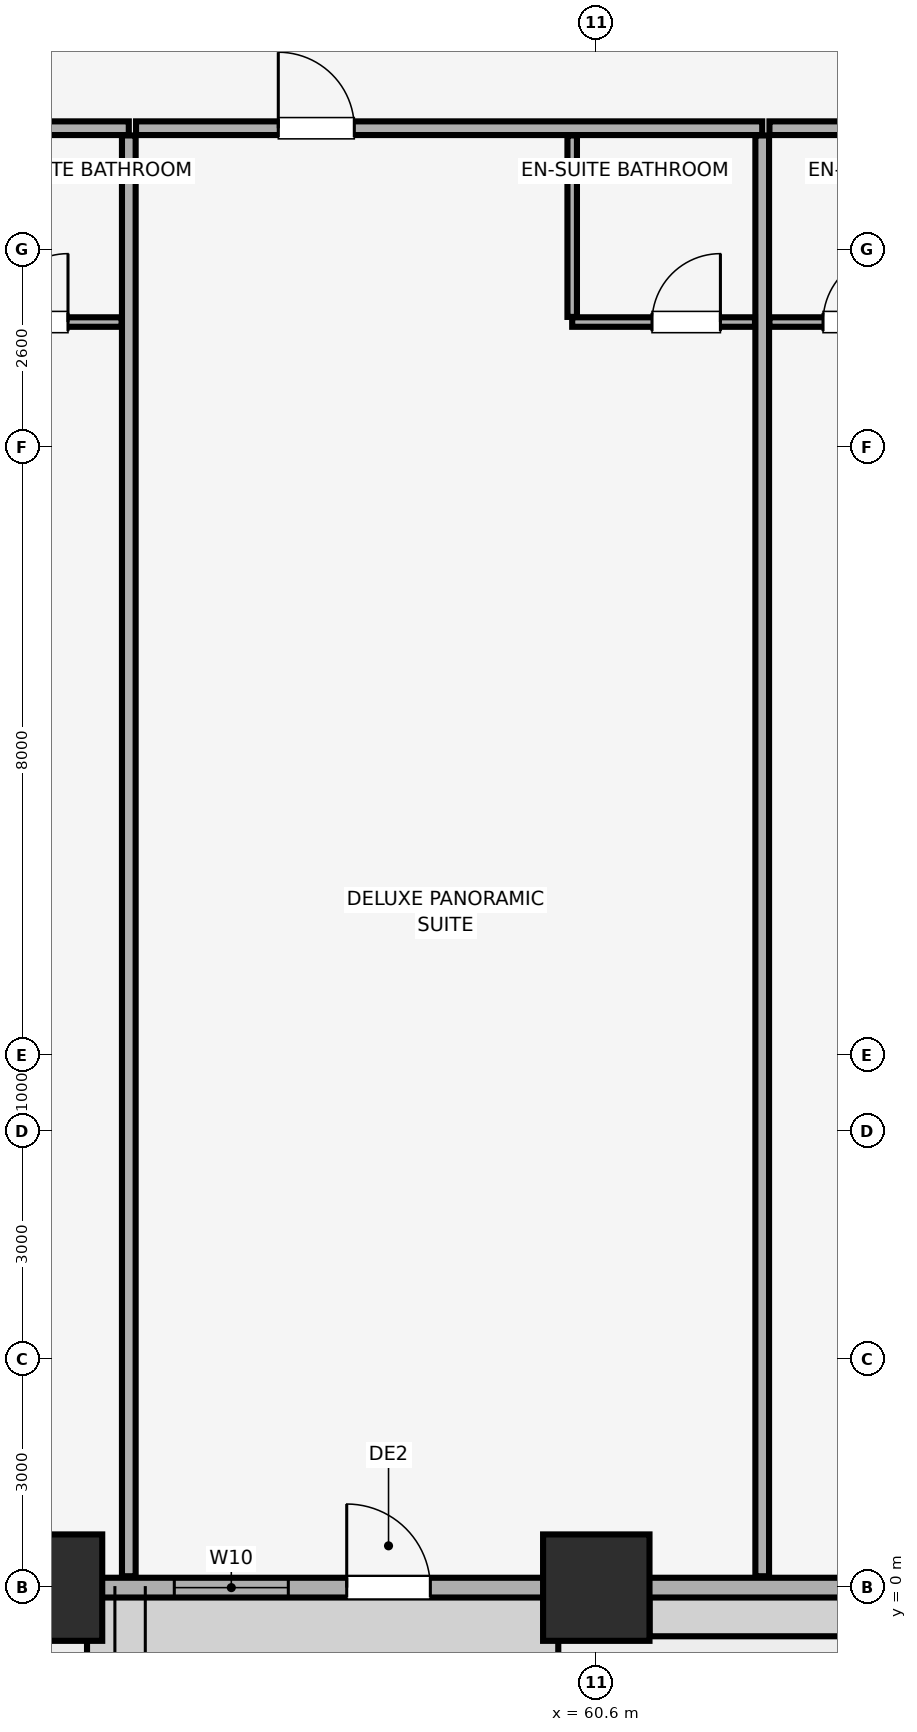
"""IFC4 building model, lengths in metres.
Left out: names, types, materials, properties, quantities, classifications, styles, units other than length and angle.
Written with IfcOpenShell. Run it as: python <this file> out.ifc"""

import sys

from ifc_helpers import new_model, si_unit, direction, frame, frame_2d, origin, origin_2d, place, context, subcontext, project, spatial, rectangle, extrude, element, fill, save


model = new_model("IFC4")
c1 = context("Model", 3, precision=1e-05, world=origin(), true_north=direction((0.0, 1.0)))
c2 = subcontext(c1, "Body", "Model", "MODEL_VIEW")
j1 = project(units=[si_unit("LENGTHUNIT", "METRE"), si_unit("PLANEANGLEUNIT", "RADIAN")], contexts=[c1])
p1 = place(None, origin())
s1 = spatial("IfcSite", under=j1, at=p1, CompositionType="ELEMENT")
p2 = place(p1, origin())
s2 = spatial("IfcBuilding", under=s1, at=p2, CompositionType="ELEMENT")
p3 = place(p2, frame((0.0, 0.0, 72.65)))
s3 = spatial("IfcBuildingStorey", under=s2, at=p3, CompositionType="ELEMENT", Elevation=72.65)
for number, where, z_axis, x_axis in (
    (1, (53.4, 0.0, 0.0), (0.0, 0.0, 1.0), (1.0, 0.0, 0.0)),
    (2, (60.6, 0.0, 0.0), (0.0, 0.0, 1.0), (1.0, 0.0, 0.0)),
):
    element("IfcColumn", number, at=place(p3, frame(where, z_axis=z_axis, x_axis=x_axis)), inside=s3, PredefinedType="COLUMN", context=c2, shape_type="SweptSolid", body=[
        extrude(rectangle(XDim=1.4, YDim=1.4, at=origin_2d()), origin(), (0.0, 0.0, 1.0), 3.51),
    ])
p4 = place(p3, frame((4.2, 0.0, 0.0), z_axis=(0.0, 0.0, 1.0), x_axis=(1.0, 0.0, 0.0)))
e3 = element("IfcWall", 3, at=p4, inside=s3, PredefinedType="SOLIDWALL", context=c2, shape_type="SweptSolid", body=[
    extrude(rectangle(XDim=75.6, YDim=0.26, at=frame_2d((37.8, 0.0))), origin(), (0.0, 0.0, 1.0), 2.56),
])
p5 = place(p4, frame((21.383, 0.0, 0.0)))
e4 = element("IfcOpeningElement", 4, at=p5, cuts=e3, PredefinedType="OPENING", context=c2, shape_type="SweptSolid", body=[
    extrude(rectangle(XDim=1.1, YDim=2.15, at=frame_2d((0.55, 1.075))), frame((0.0, 0.14, 0.0), z_axis=(0.0, -1.0, 0.0), x_axis=(1.0, 0.0, 0.0)), (0.0, 0.0, 1.0), 0.28),
])
p6 = place(p4, frame((37.25, 0.0, 0.0)))
e5 = element("IfcOpeningElement", 5, at=p6, cuts=e3, PredefinedType="OPENING", context=c2, shape_type="SweptSolid", body=[
    extrude(rectangle(XDim=1.1, YDim=2.15, at=frame_2d((0.55, 1.075))), frame((0.0, 0.14, 0.0), z_axis=(0.0, -1.0, 0.0), x_axis=(1.0, 0.0, 0.0)), (0.0, 0.0, 1.0), 0.28),
])
p7 = place(p4, frame((53.117, 0.0, 0.0)))
e6 = element("IfcOpeningElement", 6, at=p7, cuts=e3, PredefinedType="OPENING", context=c2, shape_type="SweptSolid", body=[
    extrude(rectangle(XDim=1.1, YDim=2.15, at=frame_2d((0.55, 1.075))), frame((0.0, 0.14, 0.0), z_axis=(0.0, -1.0, 0.0), x_axis=(1.0, 0.0, 0.0)), (0.0, 0.0, 1.0), 0.28),
])
p8 = place(p4, frame((1.035, 0.0, 0.85)))
e7 = element("IfcOpeningElement", 7, at=p8, cuts=e3, PredefinedType="OPENING", context=c2, shape_type="SweptSolid", body=[
    extrude(rectangle(XDim=2.4, YDim=1.5, at=frame_2d((1.2, 0.75))), frame((0.0, 0.14, 0.0), z_axis=(0.0, -1.0, 0.0), x_axis=(1.0, 0.0, 0.0)), (0.0, 0.0, 1.0), 0.28),
])
p9 = place(p4, frame((5.691, 0.0, 0.85)))
e8 = element("IfcOpeningElement", 8, at=p9, cuts=e3, PredefinedType="OPENING", context=c2, shape_type="SweptSolid", body=[
    extrude(rectangle(XDim=2.4, YDim=1.5, at=frame_2d((1.2, 0.75))), frame((0.0, 0.14, 0.0), z_axis=(0.0, -1.0, 0.0), x_axis=(1.0, 0.0, 0.0)), (0.0, 0.0, 1.0), 0.28),
])
p10 = place(p4, frame((9.342, 0.0, 0.85)))
e9 = element("IfcOpeningElement", 9, at=p10, cuts=e3, PredefinedType="OPENING", context=c2, shape_type="SweptSolid", body=[
    extrude(rectangle(XDim=1.5, YDim=1.4, at=frame_2d((0.75, 0.7))), frame((0.0, 0.14, 0.0), z_axis=(0.0, -1.0, 0.0), x_axis=(1.0, 0.0, 0.0)), (0.0, 0.0, 1.0), 0.28),
])
p11 = place(p4, frame((13.458, 0.0, 0.85)))
e10 = element("IfcOpeningElement", 10, at=p11, cuts=e3, PredefinedType="OPENING", context=c2, shape_type="SweptSolid", body=[
    extrude(rectangle(XDim=2.4, YDim=1.5, at=frame_2d((1.2, 0.75))), frame((0.0, 0.14, 0.0), z_axis=(0.0, -1.0, 0.0), x_axis=(1.0, 0.0, 0.0)), (0.0, 0.0, 1.0), 0.28),
])
p12 = place(p4, frame((23.202, 0.0, 0.85)))
e11 = element("IfcOpeningElement", 11, at=p12, cuts=e3, PredefinedType="OPENING", context=c2, shape_type="SweptSolid", body=[
    extrude(rectangle(XDim=1.5, YDim=1.4, at=frame_2d((0.75, 0.7))), frame((0.0, 0.14, 0.0), z_axis=(0.0, -1.0, 0.0), x_axis=(1.0, 0.0, 0.0)), (0.0, 0.0, 1.0), 0.28),
])
p13 = place(p4, frame((28.8, 0.0, 0.85)))
e12 = element("IfcOpeningElement", 12, at=p13, cuts=e3, PredefinedType="OPENING", context=c2, shape_type="SweptSolid", body=[
    extrude(rectangle(XDim=2.4, YDim=1.5, at=frame_2d((1.2, 0.75))), frame((0.0, 0.14, 0.0), z_axis=(0.0, -1.0, 0.0), x_axis=(1.0, 0.0, 0.0)), (0.0, 0.0, 1.0), 0.28),
])
p14 = place(p4, frame((34.79, 0.0, 0.85)))
e13 = element("IfcOpeningElement", 13, at=p14, cuts=e3, PredefinedType="OPENING", context=c2, shape_type="SweptSolid", body=[
    extrude(rectangle(XDim=1.5, YDim=1.4, at=frame_2d((0.75, 0.7))), frame((0.0, 0.14, 0.0), z_axis=(0.0, -1.0, 0.0), x_axis=(1.0, 0.0, 0.0)), (0.0, 0.0, 1.0), 0.28),
])
p15 = place(p4, frame((39.31, 0.0, 0.85)))
e14 = element("IfcOpeningElement", 14, at=p15, cuts=e3, PredefinedType="OPENING", context=c2, shape_type="SweptSolid", body=[
    extrude(rectangle(XDim=1.5, YDim=1.4, at=frame_2d((0.75, 0.7))), frame((0.0, 0.14, 0.0), z_axis=(0.0, -1.0, 0.0), x_axis=(1.0, 0.0, 0.0)), (0.0, 0.0, 1.0), 0.28),
])
p16 = place(p4, frame((44.4, 0.0, 0.85)))
e15 = element("IfcOpeningElement", 15, at=p16, cuts=e3, PredefinedType="OPENING", context=c2, shape_type="SweptSolid", body=[
    extrude(rectangle(XDim=2.4, YDim=1.5, at=frame_2d((1.2, 0.75))), frame((0.0, 0.14, 0.0), z_axis=(0.0, -1.0, 0.0), x_axis=(1.0, 0.0, 0.0)), (0.0, 0.0, 1.0), 0.28),
])
p17 = place(p4, frame((50.848, 0.0, 0.85)))
e16 = element("IfcOpeningElement", 16, at=p17, cuts=e3, PredefinedType="OPENING", context=c2, shape_type="SweptSolid", body=[
    extrude(rectangle(XDim=1.5, YDim=1.4, at=frame_2d((0.75, 0.7))), frame((0.0, 0.14, 0.0), z_axis=(0.0, -1.0, 0.0), x_axis=(1.0, 0.0, 0.0)), (0.0, 0.0, 1.0), 0.28),
])
p18 = place(p4, frame((59.691, 0.0, 0.85)))
e17 = element("IfcOpeningElement", 17, at=p18, cuts=e3, PredefinedType="OPENING", context=c2, shape_type="SweptSolid", body=[
    extrude(rectangle(XDim=2.4, YDim=1.5, at=frame_2d((1.2, 0.75))), frame((0.0, 0.14, 0.0), z_axis=(0.0, -1.0, 0.0), x_axis=(1.0, 0.0, 0.0)), (0.0, 0.0, 1.0), 0.28),
])
p19 = place(p4, frame((64.708, 0.0, 0.85)))
e18 = element("IfcOpeningElement", 18, at=p19, cuts=e3, PredefinedType="OPENING", context=c2, shape_type="SweptSolid", body=[
    extrude(rectangle(XDim=1.5, YDim=1.4, at=frame_2d((0.75, 0.7))), frame((0.0, 0.14, 0.0), z_axis=(0.0, -1.0, 0.0), x_axis=(1.0, 0.0, 0.0)), (0.0, 0.0, 1.0), 0.28),
])
p20 = place(p4, frame((67.458, 0.0, 0.85)))
e19 = element("IfcOpeningElement", 19, at=p20, cuts=e3, PredefinedType="OPENING", context=c2, shape_type="SweptSolid", body=[
    extrude(rectangle(XDim=2.4, YDim=1.5, at=frame_2d((1.2, 0.75))), frame((0.0, 0.14, 0.0), z_axis=(0.0, -1.0, 0.0), x_axis=(1.0, 0.0, 0.0)), (0.0, 0.0, 1.0), 0.28),
])
p21 = place(p4, frame((72.165, 0.0, 0.85)))
e20 = element("IfcOpeningElement", 20, at=p21, cuts=e3, PredefinedType="OPENING", context=c2, shape_type="SweptSolid", body=[
    extrude(rectangle(XDim=2.4, YDim=1.5, at=frame_2d((1.2, 0.75))), frame((0.0, 0.14, 0.0), z_axis=(0.0, -1.0, 0.0), x_axis=(1.0, 0.0, 0.0)), (0.0, 0.0, 1.0), 0.28),
])
p22 = place(p3, frame((46.211, 19.2, 0.0), z_axis=(0.0, 0.0, 1.0), x_axis=(1.0, 0.0, 0.0)))
e21 = element("IfcWall", 21, at=p22, inside=s3, PredefinedType="PARTITIONING", context=c2, shape_type="SweptSolid", body=[
    extrude(rectangle(XDim=8.238, YDim=0.18, at=frame_2d((4.119, 0.0))), origin(), (0.0, 0.0, 1.0), 3.51),
])
p23 = place(p22, frame((2.303, 0.0, 0.0)))
e22 = element("IfcOpeningElement", 22, at=p23, cuts=e21, PredefinedType="OPENING", context=c2, shape_type="SweptSolid", body=[
    extrude(rectangle(XDim=1.0, YDim=2.15, at=frame_2d((0.5, 1.075))), frame((0.0, 0.1, 0.0), z_axis=(0.0, -1.0, 0.0), x_axis=(1.0, 0.0, 0.0)), (0.0, 0.0, 1.0), 0.2),
])
p24 = place(p3, frame((54.45, 0.15, 0.0), z_axis=(0.0, 0.0, 1.0), x_axis=(0.0, 1.0, 0.0)))
e23 = element("IfcWall", 23, at=p24, inside=s3, PredefinedType="PARTITIONING", context=c2, shape_type="SweptSolid", body=[
    extrude(rectangle(XDim=18.955, YDim=0.18, at=frame_2d((9.478, 0.0))), origin(), (0.0, 0.0, 1.0), 3.51),
])
p25 = place(p3, frame((51.95, 16.65, 0.0), z_axis=(0.0, 0.0, 1.0), x_axis=(1.0, 0.0, 0.0)))
e24 = element("IfcWall", 24, at=p25, inside=s3, PredefinedType="PARTITIONING", context=c2, shape_type="SweptSolid", body=[
    extrude(rectangle(XDim=2.405, YDim=0.125, at=frame_2d((1.203, 0.0))), origin(), (0.0, 0.0, 1.0), 3.51),
])
p26 = place(p25, frame((0.8, 0.0, 0.0)))
e25 = element("IfcOpeningElement", 25, at=p26, cuts=e24, PredefinedType="OPENING", context=c2, shape_type="SweptSolid", body=[
    extrude(rectangle(XDim=0.9, YDim=2.1, at=frame_2d((0.45, 1.05))), frame((0.0, 0.073, 0.0), z_axis=(0.0, -1.0, 0.0), x_axis=(1.0, 0.0, 0.0)), (0.0, 0.0, 1.0), 0.145),
])
p27 = place(p3, frame((54.545, 19.2, 0.0), z_axis=(0.0, 0.0, 1.0), x_axis=(1.0, 0.0, 0.0)))
e26 = element("IfcWall", 26, at=p27, inside=s3, PredefinedType="PARTITIONING", context=c2, shape_type="SweptSolid", body=[
    extrude(rectangle(XDim=8.238, YDim=0.18, at=frame_2d((4.119, 0.0))), origin(), (0.0, 0.0, 1.0), 3.51),
])
p28 = place(p27, frame((1.872, 0.0, 0.0)))
e27 = element("IfcOpeningElement", 27, at=p28, cuts=e26, PredefinedType="OPENING", context=c2, shape_type="SweptSolid", body=[
    extrude(rectangle(XDim=1.0, YDim=2.15, at=frame_2d((0.5, 1.075))), frame((0.0, 0.1, 0.0), z_axis=(0.0, -1.0, 0.0), x_axis=(1.0, 0.0, 0.0)), (0.0, 0.0, 1.0), 0.2),
])
p29 = place(p3, frame((62.783, 0.15, 0.0), z_axis=(0.0, 0.0, 1.0), x_axis=(0.0, 1.0, 0.0)))
e28 = element("IfcWall", 28, at=p29, inside=s3, PredefinedType="PARTITIONING", context=c2, shape_type="SweptSolid", body=[
    extrude(rectangle(XDim=18.955, YDim=0.18, at=frame_2d((9.478, 0.0))), origin(), (0.0, 0.0, 1.0), 3.51),
])
p30 = place(p3, frame((60.283, 16.65, 0.0), z_axis=(0.0, 0.0, 1.0), x_axis=(1.0, 0.0, 0.0)))
e29 = element("IfcWall", 29, at=p30, inside=s3, PredefinedType="PARTITIONING", context=c2, shape_type="SweptSolid", body=[
    extrude(rectangle(XDim=2.405, YDim=0.125, at=frame_2d((1.203, 0.0))), origin(), (0.0, 0.0, 1.0), 3.51),
])
p31 = place(p30, frame((1.05, 0.0, 0.0)))
e30 = element("IfcOpeningElement", 30, at=p31, cuts=e29, PredefinedType="OPENING", context=c2, shape_type="SweptSolid", body=[
    extrude(rectangle(XDim=0.9, YDim=2.1, at=frame_2d((0.45, 1.05))), frame((0.0, 0.073, 0.0), z_axis=(0.0, -1.0, 0.0), x_axis=(1.0, 0.0, 0.0)), (0.0, 0.0, 1.0), 0.145),
])
p32 = place(p3, frame((60.283, 16.718, 0.0), z_axis=(0.0, 0.0, 1.0), x_axis=(0.0, 1.0, 0.0)))
e31 = element("IfcWall", 31, at=p32, inside=s3, PredefinedType="PARTITIONING", context=c2, shape_type="SweptSolid", body=[
    extrude(rectangle(XDim=2.387, YDim=0.125, at=frame_2d((1.194, 0.0))), origin(), (0.0, 0.0, 1.0), 3.51),
])
p33 = place(p3, frame((62.878, 19.2, 0.0), z_axis=(0.0, 0.0, 1.0), x_axis=(1.0, 0.0, 0.0)))
e32 = element("IfcWall", 32, at=p33, inside=s3, PredefinedType="PARTITIONING", context=c2, shape_type="SweptSolid", body=[
    extrude(rectangle(XDim=8.238, YDim=0.18, at=frame_2d((4.119, 0.0))), origin(), (0.0, 0.0, 1.0), 3.51),
])
p34 = place(p33, frame((6.47, 0.0, 0.0)))
e33 = element("IfcOpeningElement", 33, at=p34, cuts=e32, PredefinedType="OPENING", context=c2, shape_type="SweptSolid", body=[
    extrude(rectangle(XDim=1.0, YDim=2.15, at=frame_2d((0.5, 1.075))), frame((0.0, 0.1, 0.0), z_axis=(0.0, -1.0, 0.0), x_axis=(1.0, 0.0, 0.0)), (0.0, 0.0, 1.0), 0.2),
])
p35 = place(p3, frame((62.878, 16.65, 0.0), z_axis=(0.0, 0.0, 1.0), x_axis=(1.0, 0.0, 0.0)))
e34 = element("IfcWall", 34, at=p35, inside=s3, PredefinedType="PARTITIONING", context=c2, shape_type="SweptSolid", body=[
    extrude(rectangle(XDim=2.405, YDim=0.125, at=frame_2d((1.203, 0.0))), origin(), (0.0, 0.0, 1.0), 3.51),
])
p36 = place(p35, frame((0.705, 0.0, 0.0)))
e35 = element("IfcOpeningElement", 35, at=p36, cuts=e34, PredefinedType="OPENING", context=c2, shape_type="SweptSolid", body=[
    extrude(rectangle(XDim=0.9, YDim=2.1, at=frame_2d((0.45, 1.05))), frame((0.0, 0.073, 0.0), z_axis=(0.0, -1.0, 0.0), x_axis=(1.0, 0.0, 0.0)), (0.0, 0.0, 1.0), 0.145),
])
p37 = place(p7, origin())
e36 = element("IfcDoor", 36, at=p37, inside=s3, OperationType="SINGLE_SWING_LEFT", PredefinedType="DOOR", context=c2, shape_type="SweptSolid", body=[
    extrude(rectangle(XDim=1.1, YDim=2.15, at=frame_2d((0.55, 1.075))), frame((0.0, 0.025, 0.0), z_axis=(0.0, -1.0, 0.0), x_axis=(1.0, 0.0, 0.0)), (0.0, 0.0, 1.0), 0.05),
])
fill(e6, e36)
p38 = place(p17, origin())
e37 = element("IfcWindow", 37, at=p38, inside=s3, PartitioningType="SINGLE_PANEL", PredefinedType="WINDOW", context=c2, shape_type="SweptSolid", body=[
    extrude(rectangle(XDim=1.5, YDim=1.4, at=frame_2d((0.75, 0.7))), frame((0.0, 0.03, 0.0), z_axis=(0.0, -1.0, 0.0), x_axis=(1.0, 0.0, 0.0)), (0.0, 0.0, 1.0), 0.06),
])
fill(e16, e37)
p39 = place(p26, origin())
e38 = element("IfcDoor", 38, at=p39, inside=s3, OperationType="SINGLE_SWING_RIGHT", PredefinedType="DOOR", context=c2, shape_type="SweptSolid", body=[
    extrude(rectangle(XDim=0.9, YDim=2.1, at=frame_2d((0.45, 1.05))), frame((0.0, 0.025, 0.0), z_axis=(0.0, -1.0, 0.0), x_axis=(1.0, 0.0, 0.0)), (0.0, 0.0, 1.0), 0.05),
])
fill(e25, e38)
p40 = place(p28, origin())
e39 = element("IfcDoor", 39, at=p40, inside=s3, OperationType="SINGLE_SWING_LEFT", PredefinedType="DOOR", context=c2, shape_type="SweptSolid", body=[
    extrude(rectangle(XDim=1.0, YDim=2.15, at=frame_2d((0.5, 1.075))), frame((0.0, 0.025, 0.0), z_axis=(0.0, -1.0, 0.0), x_axis=(1.0, 0.0, 0.0)), (0.0, 0.0, 1.0), 0.05),
])
fill(e27, e39)
p41 = place(p31, origin())
e40 = element("IfcDoor", 40, at=p41, inside=s3, OperationType="SINGLE_SWING_RIGHT", PredefinedType="DOOR", context=c2, shape_type="SweptSolid", body=[
    extrude(rectangle(XDim=0.9, YDim=2.1, at=frame_2d((0.45, 1.05))), frame((0.0, 0.025, 0.0), z_axis=(0.0, -1.0, 0.0), x_axis=(1.0, 0.0, 0.0)), (0.0, 0.0, 1.0), 0.05),
])
fill(e30, e40)
p42 = place(p36, origin())
e41 = element("IfcDoor", 41, at=p42, inside=s3, OperationType="SINGLE_SWING_RIGHT", PredefinedType="DOOR", context=c2, shape_type="SweptSolid", body=[
    extrude(rectangle(XDim=0.9, YDim=2.1, at=frame_2d((0.45, 1.05))), frame((0.0, 0.025, 0.0), z_axis=(0.0, -1.0, 0.0), x_axis=(1.0, 0.0, 0.0)), (0.0, 0.0, 1.0), 0.05),
])
fill(e35, e41)
save(model, sys.argv[1])
